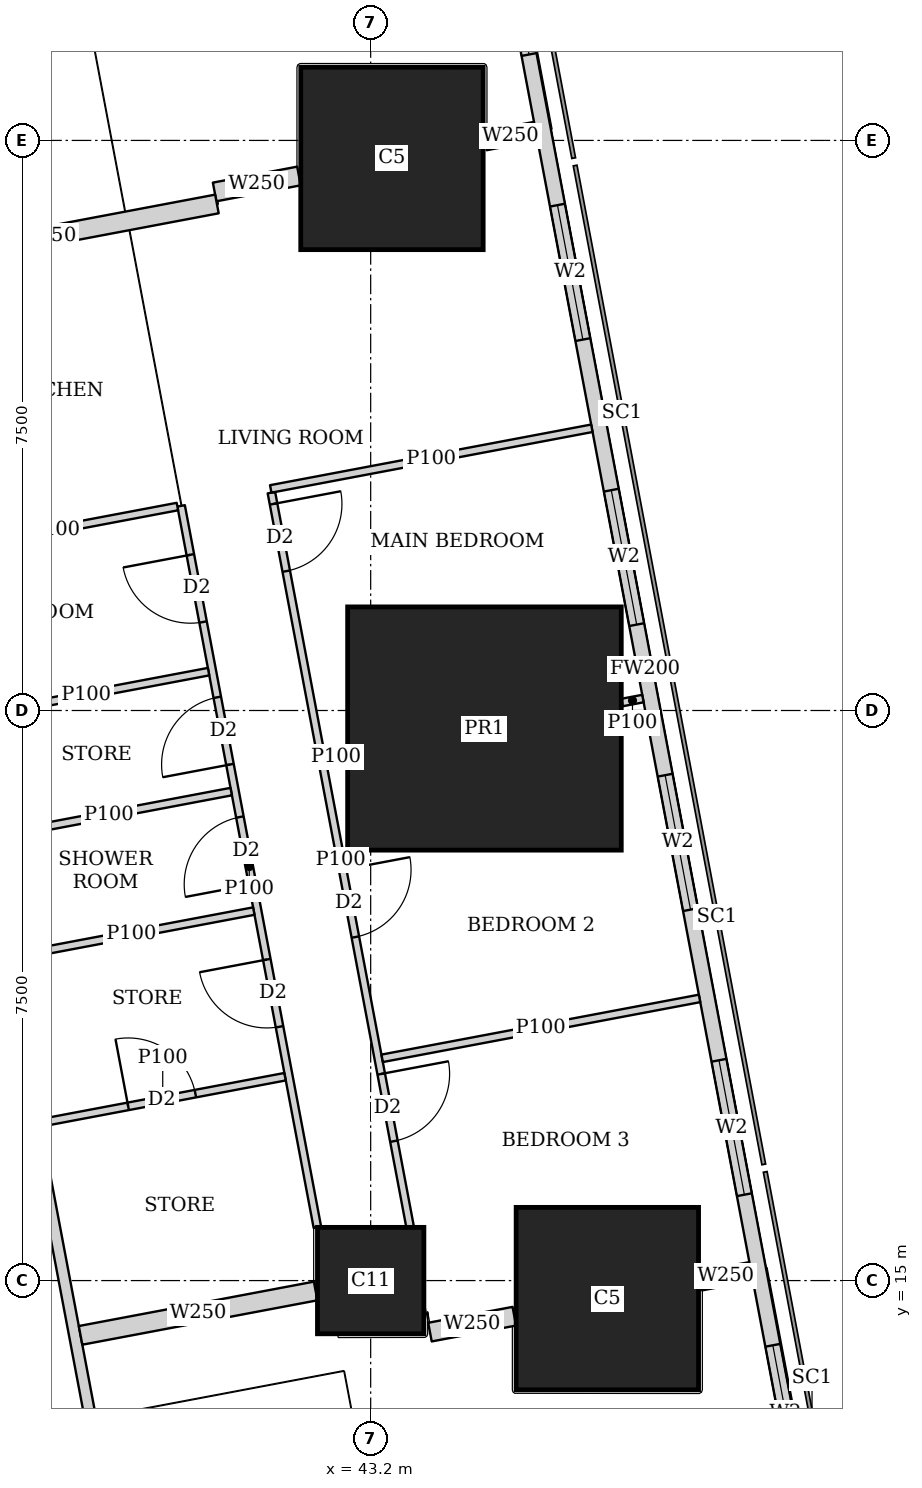
"""IFC4 building model, lengths in metres.
Left out: names, types, materials, properties, quantities, classifications, styles, units other than length and angle.
Written with IfcOpenShell. Run it as: python <this file> out.ifc"""

import sys

from ifc_helpers import new_model, si_unit, direction, frame, frame_2d, origin, origin_2d, place, context, subcontext, project, spatial, rectangle, extrude, element, fill, save


model = new_model("IFC4")
c1 = context("Model", 3, precision=1e-05, world=origin(), true_north=direction((0.0, 1.0)))
c2 = subcontext(c1, "Body", "Model", "MODEL_VIEW")
j1 = project(units=[si_unit("LENGTHUNIT", "METRE"), si_unit("PLANEANGLEUNIT", "RADIAN")], contexts=[c1])
p1 = place(None, origin())
s1 = spatial("IfcSite", under=j1, at=p1, CompositionType="ELEMENT")
p2 = place(p1, origin())
s2 = spatial("IfcBuilding", under=s1, at=p2, CompositionType="ELEMENT")
p3 = place(p2, frame((0.0, 0.0, 234.95)))
s3 = spatial("IfcBuildingStorey", under=s2, at=p3, CompositionType="ELEMENT", Elevation=234.95)
p4 = place(p3, frame((43.2, 15.0, 0.0), z_axis=(0.0, 0.0, 1.0), x_axis=(1.0, 0.0, 0.0)))
e1 = element("IfcColumn", 1, at=p4, inside=s3, PredefinedType="COLUMN", context=c2, shape_type="SweptSolid", body=[
    extrude(rectangle(XDim=1.4, YDim=1.4, at=origin_2d()), origin(), (0.0, 0.0, 1.0), 3.75),
])
p5 = place(p3, frame((46.314, 14.763, 0.0), z_axis=(0.0, 0.0, 1.0), x_axis=(1.0, 0.0, 0.0)))
e2 = element("IfcColumn", 2, at=p5, inside=s3, PredefinedType="COLUMN", context=c2, shape_type="SweptSolid", body=[
    extrude(rectangle(XDim=2.4, YDim=2.4, at=origin_2d()), origin(), (0.0, 0.0, 1.0), 3.75),
])
p6 = place(p3, frame((44.697, 22.263, 0.0), z_axis=(0.0, 0.0, 1.0), x_axis=(1.0, 0.0, 0.0)))
e3 = element("IfcColumn", 3, at=p6, inside=s3, PredefinedType="COLUMN", context=c2, shape_type="SweptSolid", body=[
    extrude(rectangle(XDim=3.6, YDim=3.2, at=origin_2d()), origin(), (0.0, 0.0, 1.0), 3.75),
])
p7 = place(p3, frame((43.48, 29.763, 0.0), z_axis=(0.0, 0.0, 1.0), x_axis=(1.0, 0.0, 0.0)))
e4 = element("IfcColumn", 4, at=p7, inside=s3, PredefinedType="COLUMN", context=c2, shape_type="SweptSolid", body=[
    extrude(rectangle(XDim=2.4, YDim=2.4, at=origin_2d()), origin(), (0.0, 0.0, 1.0), 3.75),
])
p8 = place(p3, frame((50.653, 2.703, 0.0), z_axis=(0.0, 0.0, 1.0), x_axis=(-0.185612026696, 0.982623109613, 0.0)))
e5 = element("IfcWall", 5, at=p8, inside=s3, PredefinedType="SOLIDWALL", context=c2, shape_type="SweptSolid", body=[
    extrude(rectangle(XDim=41.393, YDim=0.2, at=frame_2d((20.697, 0.0))), origin(), (0.0, 0.0, 1.0), 3.5),
])
p9 = place(p8, frame((1.633, 0.0, 0.9)))
e6 = element("IfcOpeningElement", 6, at=p9, cuts=e5, PredefinedType="OPENING", context=c2, shape_type="SweptSolid", body=[
    extrude(rectangle(XDim=1.8, YDim=1.5, at=frame_2d((0.9, 0.75))), frame((0.0, 0.11, 0.0), z_axis=(0.0, -1.0, 0.0), x_axis=(1.0, 0.0, 0.0)), (0.0, 0.0, 1.0), 0.22),
])
p10 = place(p8, frame((6.032, 0.0, 0.9)))
e7 = element("IfcOpeningElement", 7, at=p10, cuts=e5, PredefinedType="OPENING", context=c2, shape_type="SweptSolid", body=[
    extrude(rectangle(XDim=1.8, YDim=1.5, at=frame_2d((0.9, 0.75))), frame((0.0, 0.11, 0.0), z_axis=(0.0, -1.0, 0.0), x_axis=(1.0, 0.0, 0.0)), (0.0, 0.0, 1.0), 0.22),
])
p11 = place(p8, frame((9.848, 0.0, 0.9)))
e8 = element("IfcOpeningElement", 8, at=p11, cuts=e5, PredefinedType="OPENING", context=c2, shape_type="SweptSolid", body=[
    extrude(rectangle(XDim=1.8, YDim=1.5, at=frame_2d((0.9, 0.75))), frame((0.0, 0.11, 0.0), z_axis=(0.0, -1.0, 0.0), x_axis=(1.0, 0.0, 0.0)), (0.0, 0.0, 1.0), 0.22),
])
p12 = place(p8, frame((13.664, 0.0, 0.9)))
e9 = element("IfcOpeningElement", 9, at=p12, cuts=e5, PredefinedType="OPENING", context=c2, shape_type="SweptSolid", body=[
    extrude(rectangle(XDim=1.8, YDim=1.5, at=frame_2d((0.9, 0.75))), frame((0.0, 0.11, 0.0), z_axis=(0.0, -1.0, 0.0), x_axis=(1.0, 0.0, 0.0)), (0.0, 0.0, 1.0), 0.22),
])
p13 = place(p8, frame((17.481, 0.0, 0.9)))
e10 = element("IfcOpeningElement", 10, at=p13, cuts=e5, PredefinedType="OPENING", context=c2, shape_type="SweptSolid", body=[
    extrude(rectangle(XDim=1.8, YDim=1.5, at=frame_2d((0.9, 0.75))), frame((0.0, 0.11, 0.0), z_axis=(0.0, -1.0, 0.0), x_axis=(1.0, 0.0, 0.0)), (0.0, 0.0, 1.0), 0.22),
])
p14 = place(p8, frame((21.297, 0.0, 0.9)))
e11 = element("IfcOpeningElement", 11, at=p14, cuts=e5, PredefinedType="OPENING", context=c2, shape_type="SweptSolid", body=[
    extrude(rectangle(XDim=1.8, YDim=1.5, at=frame_2d((0.9, 0.75))), frame((0.0, 0.11, 0.0), z_axis=(0.0, -1.0, 0.0), x_axis=(1.0, 0.0, 0.0)), (0.0, 0.0, 1.0), 0.22),
])
p15 = place(p8, frame((25.113, 0.0, 0.9)))
e12 = element("IfcOpeningElement", 12, at=p15, cuts=e5, PredefinedType="OPENING", context=c2, shape_type="SweptSolid", body=[
    extrude(rectangle(XDim=1.8, YDim=1.5, at=frame_2d((0.9, 0.75))), frame((0.0, 0.11, 0.0), z_axis=(0.0, -1.0, 0.0), x_axis=(1.0, 0.0, 0.0)), (0.0, 0.0, 1.0), 0.22),
])
p16 = place(p8, frame((28.93, 0.0, 0.9)))
e13 = element("IfcOpeningElement", 13, at=p16, cuts=e5, PredefinedType="OPENING", context=c2, shape_type="SweptSolid", body=[
    extrude(rectangle(XDim=1.8, YDim=1.5, at=frame_2d((0.9, 0.75))), frame((0.0, 0.11, 0.0), z_axis=(0.0, -1.0, 0.0), x_axis=(1.0, 0.0, 0.0)), (0.0, 0.0, 1.0), 0.22),
])
p17 = place(p8, frame((32.746, 0.0, 0.9)))
e14 = element("IfcOpeningElement", 14, at=p17, cuts=e5, PredefinedType="OPENING", context=c2, shape_type="SweptSolid", body=[
    extrude(rectangle(XDim=1.8, YDim=1.5, at=frame_2d((0.9, 0.75))), frame((0.0, 0.11, 0.0), z_axis=(0.0, -1.0, 0.0), x_axis=(1.0, 0.0, 0.0)), (0.0, 0.0, 1.0), 0.22),
])
p18 = place(p8, frame((36.481, 0.0, 0.9)))
e15 = element("IfcOpeningElement", 15, at=p18, cuts=e5, PredefinedType="OPENING", context=c2, shape_type="SweptSolid", body=[
    extrude(rectangle(XDim=1.8, YDim=1.5, at=frame_2d((0.9, 0.75))), frame((0.0, 0.11, 0.0), z_axis=(0.0, -1.0, 0.0), x_axis=(1.0, 0.0, 0.0)), (0.0, 0.0, 1.0), 0.22),
])
p19 = place(p3, frame((33.933, 42.73, 0.0), z_axis=(0.0, 0.0, 1.0), x_axis=(0.185595417643, -0.982626246825, 0.0)))
e16 = element("IfcWall", 16, at=p19, inside=s3, PredefinedType="SOLIDWALL", context=c2, shape_type="SweptSolid", body=[
    extrude(rectangle(XDim=41.051, YDim=0.15, at=frame_2d((20.525, 0.0))), origin(), (0.0, 0.0, 1.0), 2.5),
])
p20 = place(p19, frame((12.266, 0.0, 0.0)))
e17 = element("IfcOpeningElement", 17, at=p20, cuts=e16, PredefinedType="OPENING", context=c2, shape_type="SweptSolid", body=[
    extrude(rectangle(XDim=1.0, YDim=2.1, at=frame_2d((0.5, 1.05))), frame((0.0, 0.085, 0.0), z_axis=(0.0, -1.0, 0.0), x_axis=(1.0, 0.0, 0.0)), (0.0, 0.0, 1.0), 0.17),
])
p21 = place(p19, frame((16.082, 0.0, 0.0)))
e18 = element("IfcOpeningElement", 18, at=p21, cuts=e16, PredefinedType="OPENING", context=c2, shape_type="SweptSolid", body=[
    extrude(rectangle(XDim=1.0, YDim=2.1, at=frame_2d((0.5, 1.05))), frame((0.0, 0.085, 0.0), z_axis=(0.0, -1.0, 0.0), x_axis=(1.0, 0.0, 0.0)), (0.0, 0.0, 1.0), 0.17),
])
p22 = place(p19, frame((30.862, 0.0, 0.0)))
e19 = element("IfcOpeningElement", 19, at=p22, cuts=e16, PredefinedType="OPENING", context=c2, shape_type="SweptSolid", body=[
    extrude(rectangle(XDim=1.0, YDim=2.1, at=frame_2d((0.5, 1.05))), frame((0.0, 0.085, 0.0), z_axis=(0.0, -1.0, 0.0), x_axis=(1.0, 0.0, 0.0)), (0.0, 0.0, 1.0), 0.17),
])
p23 = place(p3, frame((41.894, 25.366, 0.0), z_axis=(0.0, 0.0, 1.0), x_axis=(0.185612905165, -0.982622943675, 0.0)))
e20 = element("IfcWall", 20, at=p23, inside=s3, PredefinedType="PARTITIONING", context=c2, shape_type="SweptSolid", body=[
    extrude(rectangle(XDim=9.827, YDim=0.1, at=frame_2d((4.913, 0.0))), origin(), (0.0, 0.0, 1.0), 2.5),
])
p24 = place(p23, frame((0.151, 0.0, 0.0)))
e21 = element("IfcOpeningElement", 21, at=p24, cuts=e20, PredefinedType="OPENING", context=c2, shape_type="SweptSolid", body=[
    extrude(rectangle(XDim=0.9, YDim=2.1, at=frame_2d((0.45, 1.05))), frame((0.0, 0.06, 0.0), z_axis=(0.0, -1.0, 0.0), x_axis=(1.0, 0.0, 0.0)), (0.0, 0.0, 1.0), 0.12),
])
p25 = place(p23, frame((5.05, 0.0, 0.0)))
e22 = element("IfcOpeningElement", 22, at=p25, cuts=e20, PredefinedType="OPENING", context=c2, shape_type="SweptSolid", body=[
    extrude(rectangle(XDim=0.9, YDim=2.1, at=frame_2d((0.45, 1.05))), frame((0.0, 0.06, 0.0), z_axis=(0.0, -1.0, 0.0), x_axis=(1.0, 0.0, 0.0)), (0.0, 0.0, 1.0), 0.12),
])
p26 = place(p23, frame((7.783, 0.0, 0.0)))
e23 = element("IfcOpeningElement", 23, at=p26, cuts=e20, PredefinedType="OPENING", context=c2, shape_type="SweptSolid", body=[
    extrude(rectangle(XDim=0.9, YDim=2.1, at=frame_2d((0.45, 1.05))), frame((0.0, 0.06, 0.0), z_axis=(0.0, -1.0, 0.0), x_axis=(1.0, 0.0, 0.0)), (0.0, 0.0, 1.0), 0.12),
])
p27 = place(p3, frame((40.706, 25.192, 0.0), z_axis=(0.0, 0.0, 1.0), x_axis=(0.185629824463, -0.982619747547, 0.0)))
e24 = element("IfcWall", 24, at=p27, inside=s3, PredefinedType="PARTITIONING", context=c2, shape_type="SweptSolid", body=[
    extrude(rectangle(XDim=9.659, YDim=0.1, at=frame_2d((4.83, 0.0))), origin(), (0.0, 0.0, 1.0), 2.5),
])
p28 = place(p27, frame((0.655, 0.0, 0.0)))
e25 = element("IfcOpeningElement", 25, at=p28, cuts=e24, PredefinedType="OPENING", context=c2, shape_type="SweptSolid", body=[
    extrude(rectangle(XDim=0.9, YDim=2.1, at=frame_2d((0.45, 1.05))), frame((0.0, 0.06, 0.0), z_axis=(0.0, -1.0, 0.0), x_axis=(1.0, 0.0, 0.0)), (0.0, 0.0, 1.0), 0.12),
])
p29 = place(p27, frame((4.166, 0.0, 0.0)))
e26 = element("IfcOpeningElement", 26, at=p29, cuts=e24, PredefinedType="OPENING", context=c2, shape_type="SweptSolid", body=[
    extrude(rectangle(XDim=0.9, YDim=2.1, at=frame_2d((0.45, 1.05))), frame((0.0, 0.06, 0.0), z_axis=(0.0, -1.0, 0.0), x_axis=(1.0, 0.0, 0.0)), (0.0, 0.0, 1.0), 0.12),
])
p30 = place(p27, frame((2.563, 0.0, 0.0)))
e27 = element("IfcOpeningElement", 27, at=p30, cuts=e24, PredefinedType="OPENING", context=c2, shape_type="SweptSolid", body=[
    extrude(rectangle(XDim=0.9, YDim=2.1, at=frame_2d((0.45, 1.05))), frame((0.0, 0.06, 0.0), z_axis=(0.0, -1.0, 0.0), x_axis=(1.0, 0.0, 0.0)), (0.0, 0.0, 1.0), 0.12),
])
p31 = place(p27, frame((6.074, 0.0, 0.0)))
e28 = element("IfcOpeningElement", 28, at=p31, cuts=e24, PredefinedType="OPENING", context=c2, shape_type="SweptSolid", body=[
    extrude(rectangle(XDim=0.9, YDim=2.1, at=frame_2d((0.45, 1.05))), frame((0.0, 0.06, 0.0), z_axis=(0.0, -1.0, 0.0), x_axis=(1.0, 0.0, 0.0)), (0.0, 0.0, 1.0), 0.12),
])
p32 = place(p3, frame((46.11, 26.213, 0.0), z_axis=(0.0, 0.0, 1.0), x_axis=(-0.982633535512, -0.185556823879, 0.0)))
e29 = element("IfcWall", 29, at=p32, inside=s3, PredefinedType="PARTITIONING", context=c2, shape_type="SweptSolid", body=[
    extrude(rectangle(XDim=4.3, YDim=0.1, at=frame_2d((2.15, 0.0))), origin(), (0.0, 0.0, 1.0), 2.05),
])
p33 = place(p3, frame((46.782, 22.657, 0.0), z_axis=(0.0, 0.0, 1.0), x_axis=(-0.982574553168, -0.185868898601, 0.0)))
e30 = element("IfcWall", 30, at=p33, inside=s3, PredefinedType="PARTITIONING", context=c2, shape_type="SweptSolid", body=[
    extrude(rectangle(XDim=0.28, YDim=0.1, at=frame_2d((0.14, 0.0))), origin(), (0.0, 0.0, 1.0), 3.5),
])
p34 = place(p3, frame((42.887, 21.921, 0.0), z_axis=(0.0, 0.0, 1.0), x_axis=(-0.982688058078, -0.185267861514, 0.0)))
e31 = element("IfcWall", 31, at=p34, inside=s3, PredefinedType="PARTITIONING", context=c2, shape_type="SweptSolid", body=[
    extrude(rectangle(XDim=0.286, YDim=0.1, at=frame_2d((0.143, 0.0))), origin(), (0.0, 0.0, 1.0), 2.5),
])
p35 = place(p3, frame((47.527, 18.712, 0.0), z_axis=(0.0, 0.0, 1.0), x_axis=(-0.982665405803, -0.185387972203, 0.0)))
e32 = element("IfcWall", 32, at=p35, inside=s3, PredefinedType="PARTITIONING", context=c2, shape_type="SweptSolid", body=[
    extrude(rectangle(XDim=4.25, YDim=0.1, at=frame_2d((2.125, 0.0))), origin(), (0.0, 0.0, 1.0), 2.05),
])
for number, where, z_axis, x_axis in (
    (33, (40.657, 25.183, 0.0), (0.0, 0.0, 1.0), (-0.983, -0.186, 0.0)),
    (34, (41.365, 21.433, 0.0), (0.0, 0.0, 1.0), (-0.983, -0.186, 0.0)),
):
    element("IfcWall", number, at=place(p3, frame(where, z_axis=z_axis, x_axis=x_axis)), inside=s3, PredefinedType="PARTITIONING", context=c2, shape_type="SweptSolid", body=[
        extrude(rectangle(XDim=3.275, YDim=0.1, at=frame_2d((1.637, 0.0))), origin(), (0.0, 0.0, 1.0), 3.5),
    ])
p36 = place(p3, frame((42.073, 17.682, 0.0), z_axis=(0.0, 0.0, 1.0), x_axis=(-0.982620626894, -0.185625169636, 0.0)))
e35 = element("IfcWall", 35, at=p36, inside=s3, PredefinedType="PARTITIONING", context=c2, shape_type="SweptSolid", body=[
    extrude(rectangle(XDim=3.275, YDim=0.1, at=frame_2d((1.637, 0.0))), origin(), (0.0, 0.0, 1.0), 3.5),
])
p37 = place(p36, frame((1.2, 0.0, 0.0)))
e36 = element("IfcOpeningElement", 36, at=p37, cuts=e35, PredefinedType="OPENING", context=c2, shape_type="SweptSolid", body=[
    extrude(rectangle(XDim=0.9, YDim=2.1, at=frame_2d((0.45, 1.05))), frame((0.0, 0.06, 0.0), z_axis=(0.0, -1.0, 0.0), x_axis=(1.0, 0.0, 0.0)), (0.0, 0.0, 1.0), 0.12),
])
p38 = place(p3, frame((41.067, 23.011, 0.0), z_axis=(0.0, 0.0, 1.0), x_axis=(-0.982618057925, -0.185638768151, 0.0)))
e37 = element("IfcWall", 37, at=p38, inside=s3, PredefinedType="PARTITIONING", context=c2, shape_type="SweptSolid", body=[
    extrude(rectangle(XDim=3.275, YDim=0.1, at=frame_2d((1.637, 0.0))), origin(), (0.0, 0.0, 1.0), 2.5),
])
p39 = place(p3, frame((41.662, 19.861, 0.0), z_axis=(0.0, 0.0, 1.0), x_axis=(-0.982607026909, -0.185697147715, 0.0)))
e38 = element("IfcWall", 38, at=p39, inside=s3, PredefinedType="PARTITIONING", context=c2, shape_type="SweptSolid", body=[
    extrude(rectangle(XDim=3.275, YDim=0.1, at=frame_2d((1.637, 0.0))), origin(), (0.0, 0.0, 1.0), 3.5),
])
p40 = place(p3, frame((45.372, 30.121, 0.0), z_axis=(0.0, 0.0, 1.0), x_axis=(-0.982347993061, -0.187062611252, 0.0)))
e39 = element("IfcWall", 39, at=p40, inside=s3, PredefinedType="SOLIDWALL", context=c2, shape_type="SweptSolid", body=[
    extrude(rectangle(XDim=0.68, YDim=0.25, at=frame_2d((0.34, 0.0))), origin(), (0.0, 0.0, 1.0), 2.05),
])
p41 = place(p3, frame((42.256, 29.532, 0.0), z_axis=(0.0, 0.0, 1.0), x_axis=(-0.982549954272, -0.185998890749, 0.0)))
e40 = element("IfcWall", 40, at=p41, inside=s3, PredefinedType="SOLIDWALL", context=c2, shape_type="SweptSolid", body=[
    extrude(rectangle(XDim=1.129, YDim=0.25, at=frame_2d((0.564, 0.0))), origin(), (0.0, 0.0, 1.0), 2.05),
])
p42 = place(p3, frame((41.177, 29.164, 0.0), z_axis=(0.0, 0.0, 1.0), x_axis=(-0.982612837616, -0.185666398014, 0.0)))
e41 = element("IfcWall", 41, at=p42, inside=s3, PredefinedType="SOLIDWALL", context=c2, shape_type="SweptSolid", body=[
    extrude(rectangle(XDim=4.525, YDim=0.25, at=frame_2d((2.262, 0.0))), origin(), (0.0, 0.0, 1.0), 2.5),
])
p43 = place(p3, frame((48.206, 15.12, 0.0), z_axis=(0.0, 0.0, 1.0), x_axis=(-0.982610999048, -0.18567612811, 0.0)))
e42 = element("IfcWall", 42, at=p43, inside=s3, PredefinedType="SOLIDWALL", context=c2, shape_type="SweptSolid", body=[
    extrude(rectangle(XDim=0.68, YDim=0.25, at=frame_2d((0.34, 0.0))), origin(), (0.0, 0.0, 1.0), 2.05),
])
p44 = place(p3, frame((45.09, 14.531, 0.0), z_axis=(0.0, 0.0, 1.0), x_axis=(-0.982737354171, -0.185006196431, 0.0)))
e43 = element("IfcWall", 43, at=p44, inside=s3, PredefinedType="SOLIDWALL", context=c2, shape_type="SweptSolid", body=[
    extrude(rectangle(XDim=1.13, YDim=0.25, at=frame_2d((0.565, 0.0))), origin(), (0.0, 0.0, 1.0), 2.05),
])
p45 = place(p3, frame((42.476, 14.863, 0.0), z_axis=(0.0, 0.0, 1.0), x_axis=(-0.982638716117, -0.185529387398, 0.0)))
e44 = element("IfcWall", 44, at=p45, inside=s3, PredefinedType="SOLIDWALL", context=c2, shape_type="SweptSolid", body=[
    extrude(rectangle(XDim=3.148, YDim=0.25, at=frame_2d((1.574, 0.0))), origin(), (0.0, 0.0, 1.0), 3.5),
])
p46 = place(p11, origin())
e45 = element("IfcWindow", 45, at=p46, inside=s3, PartitioningType="SINGLE_PANEL", PredefinedType="WINDOW", context=c2, shape_type="SweptSolid", body=[
    extrude(rectangle(XDim=1.8, YDim=1.5, at=frame_2d((0.9, 0.75))), frame((0.0, 0.03, 0.0), z_axis=(0.0, -1.0, 0.0), x_axis=(1.0, 0.0, 0.0)), (0.0, 0.0, 1.0), 0.06),
])
fill(e8, e45)
p47 = place(p12, origin())
e46 = element("IfcWindow", 46, at=p47, inside=s3, PartitioningType="SINGLE_PANEL", PredefinedType="WINDOW", context=c2, shape_type="SweptSolid", body=[
    extrude(rectangle(XDim=1.8, YDim=1.5, at=frame_2d((0.9, 0.75))), frame((0.0, 0.03, 0.0), z_axis=(0.0, -1.0, 0.0), x_axis=(1.0, 0.0, 0.0)), (0.0, 0.0, 1.0), 0.06),
])
fill(e9, e46)
p48 = place(p13, origin())
e47 = element("IfcWindow", 47, at=p48, inside=s3, PartitioningType="SINGLE_PANEL", PredefinedType="WINDOW", context=c2, shape_type="SweptSolid", body=[
    extrude(rectangle(XDim=1.8, YDim=1.5, at=frame_2d((0.9, 0.75))), frame((0.0, 0.03, 0.0), z_axis=(0.0, -1.0, 0.0), x_axis=(1.0, 0.0, 0.0)), (0.0, 0.0, 1.0), 0.06),
])
fill(e10, e47)
p49 = place(p14, origin())
e48 = element("IfcWindow", 48, at=p49, inside=s3, PartitioningType="SINGLE_PANEL", PredefinedType="WINDOW", context=c2, shape_type="SweptSolid", body=[
    extrude(rectangle(XDim=1.8, YDim=1.5, at=frame_2d((0.9, 0.75))), frame((0.0, 0.03, 0.0), z_axis=(0.0, -1.0, 0.0), x_axis=(1.0, 0.0, 0.0)), (0.0, 0.0, 1.0), 0.06),
])
fill(e11, e48)
p50 = place(p15, origin())
e49 = element("IfcWindow", 49, at=p50, inside=s3, PartitioningType="SINGLE_PANEL", PredefinedType="WINDOW", context=c2, shape_type="SweptSolid", body=[
    extrude(rectangle(XDim=1.8, YDim=1.5, at=frame_2d((0.9, 0.75))), frame((0.0, 0.03, 0.0), z_axis=(0.0, -1.0, 0.0), x_axis=(1.0, 0.0, 0.0)), (0.0, 0.0, 1.0), 0.06),
])
fill(e12, e49)
p51 = place(p16, origin())
e50 = element("IfcWindow", 50, at=p51, inside=s3, PartitioningType="SINGLE_PANEL", PredefinedType="WINDOW", context=c2, shape_type="SweptSolid", body=[
    extrude(rectangle(XDim=1.8, YDim=1.5, at=frame_2d((0.9, 0.75))), frame((0.0, 0.03, 0.0), z_axis=(0.0, -1.0, 0.0), x_axis=(1.0, 0.0, 0.0)), (0.0, 0.0, 1.0), 0.06),
])
fill(e13, e50)
p52 = place(p24, origin())
e51 = element("IfcDoor", 51, at=p52, inside=s3, OperationType="SINGLE_SWING_LEFT", PredefinedType="DOOR", context=c2, shape_type="SweptSolid", body=[
    extrude(rectangle(XDim=0.9, YDim=2.1, at=frame_2d((0.45, 1.05))), frame((0.0, 0.025, 0.0), z_axis=(0.0, -1.0, 0.0), x_axis=(1.0, 0.0, 0.0)), (0.0, 0.0, 1.0), 0.05),
])
fill(e21, e51)
p53 = place(p25, origin())
e52 = element("IfcDoor", 52, at=p53, inside=s3, OperationType="SINGLE_SWING_LEFT", PredefinedType="DOOR", context=c2, shape_type="SweptSolid", body=[
    extrude(rectangle(XDim=0.9, YDim=2.1, at=frame_2d((0.45, 1.05))), frame((0.0, 0.025, 0.0), z_axis=(0.0, -1.0, 0.0), x_axis=(1.0, 0.0, 0.0)), (0.0, 0.0, 1.0), 0.05),
])
fill(e22, e52)
p54 = place(p26, origin())
e53 = element("IfcDoor", 53, at=p54, inside=s3, OperationType="SINGLE_SWING_LEFT", PredefinedType="DOOR", context=c2, shape_type="SweptSolid", body=[
    extrude(rectangle(XDim=0.9, YDim=2.1, at=frame_2d((0.45, 1.05))), frame((0.0, 0.025, 0.0), z_axis=(0.0, -1.0, 0.0), x_axis=(1.0, 0.0, 0.0)), (0.0, 0.0, 1.0), 0.05),
])
fill(e23, e53)
p55 = place(p28, origin())
e54 = element("IfcDoor", 54, at=p55, inside=s3, OperationType="SINGLE_SWING_RIGHT", PredefinedType="DOOR", context=c2, shape_type="SweptSolid", body=[
    extrude(rectangle(XDim=0.9, YDim=2.1, at=frame_2d((0.45, 1.05))), frame((0.0, 0.025, 0.0), z_axis=(0.0, -1.0, 0.0), x_axis=(1.0, 0.0, 0.0)), (0.0, 0.0, 1.0), 0.05),
])
fill(e25, e54)
p56 = place(p29, origin())
e55 = element("IfcDoor", 55, at=p56, inside=s3, OperationType="SINGLE_SWING_LEFT", PredefinedType="DOOR", context=c2, shape_type="SweptSolid", body=[
    extrude(rectangle(XDim=0.9, YDim=2.1, at=frame_2d((0.45, 1.05))), frame((0.0, 0.025, 0.0), z_axis=(0.0, -1.0, 0.0), x_axis=(1.0, 0.0, 0.0)), (0.0, 0.0, 1.0), 0.05),
])
fill(e26, e55)
p57 = place(p30, origin())
e56 = element("IfcDoor", 56, at=p57, inside=s3, OperationType="SINGLE_SWING_LEFT", PredefinedType="DOOR", context=c2, shape_type="SweptSolid", body=[
    extrude(rectangle(XDim=0.9, YDim=2.1, at=frame_2d((0.45, 1.05))), frame((0.0, 0.025, 0.0), z_axis=(0.0, -1.0, 0.0), x_axis=(1.0, 0.0, 0.0)), (0.0, 0.0, 1.0), 0.05),
])
fill(e27, e56)
p58 = place(p31, origin())
e57 = element("IfcDoor", 57, at=p58, inside=s3, OperationType="SINGLE_SWING_RIGHT", PredefinedType="DOOR", context=c2, shape_type="SweptSolid", body=[
    extrude(rectangle(XDim=0.9, YDim=2.1, at=frame_2d((0.45, 1.05))), frame((0.0, 0.025, 0.0), z_axis=(0.0, -1.0, 0.0), x_axis=(1.0, 0.0, 0.0)), (0.0, 0.0, 1.0), 0.05),
])
fill(e28, e57)
p59 = place(p37, origin())
e58 = element("IfcDoor", 58, at=p59, inside=s3, OperationType="SINGLE_SWING_LEFT", PredefinedType="DOOR", context=c2, shape_type="SweptSolid", body=[
    extrude(rectangle(XDim=0.9, YDim=2.1, at=frame_2d((0.45, 1.05))), frame((0.0, 0.025, 0.0), z_axis=(0.0, -1.0, 0.0), x_axis=(1.0, 0.0, 0.0)), (0.0, 0.0, 1.0), 0.05),
])
fill(e36, e58)
save(model, sys.argv[1])
